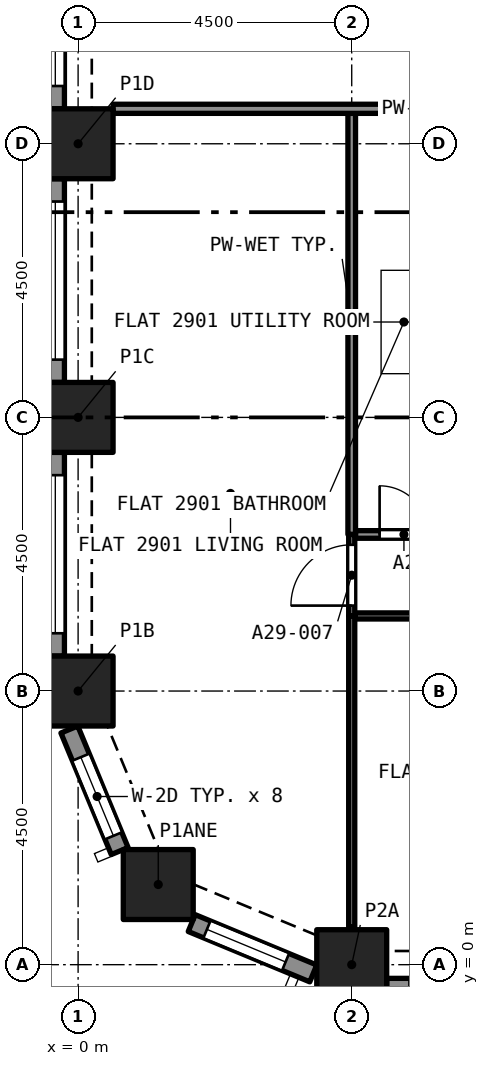
"""IFC4 building model, lengths in metres.
Left out: names, types, materials, properties, quantities, classifications, styles, units other than length and angle.
Written with IfcOpenShell. Run it as: python <this file> out.ifc"""

import sys

from ifc_helpers import new_model, si_unit, direction, frame, frame_2d, origin, origin_2d, place, context, subcontext, project, spatial, rectangle, extrude, element, fill, save


model = new_model("IFC4")
c1 = context("Model", 3, precision=1e-05, world=origin(), true_north=direction((0.0, 1.0)))
c2 = subcontext(c1, "Body", "Model", "MODEL_VIEW")
j1 = project(units=[si_unit("LENGTHUNIT", "METRE"), si_unit("PLANEANGLEUNIT", "RADIAN")], contexts=[c1])
p1 = place(None, origin())
s1 = spatial("IfcSite", under=j1, at=p1, CompositionType="ELEMENT")
p2 = place(p1, origin())
s2 = spatial("IfcBuilding", under=s1, at=p2, CompositionType="ELEMENT")
p3 = place(p2, frame((0.0, 0.0, 105.6)))
s3 = spatial("IfcBuildingStorey", under=s2, at=p3, CompositionType="ELEMENT", Elevation=105.6)
for number, where, z_axis, x_axis in (
    (1, (4.5, 0.0, 0.0), (0.0, 0.0, 1.0), (1.0, 0.0, 0.0)),
    (2, (1.318, 1.318, 0.0), (0.0, 0.0, 1.0), (1.0, 0.0, 0.0)),
    (3, (0.0, 4.5, 0.0), (0.0, 0.0, 1.0), (1.0, 0.0, 0.0)),
    (4, (0.0, 9.0, 0.0), (0.0, 0.0, 1.0), (1.0, 0.0, 0.0)),
    (5, (0.0, 13.5, 0.0), (0.0, 0.0, 1.0), (1.0, 0.0, 0.0)),
):
    element("IfcColumn", number, at=place(p3, frame(where, z_axis=z_axis, x_axis=x_axis)), inside=s3, PredefinedType="COLUMN", context=c2, shape_type="SweptSolid", body=[
        extrude(rectangle(XDim=1.15, YDim=1.15, at=origin_2d()), origin(), (0.0, 0.0, 1.0), 3.2),
    ])
p4 = place(p3, frame((0.684, 1.869, 0.0), z_axis=(0.0, 0.0, 1.0), x_axis=(-0.382723818695, 0.923862802911, 0.0)))
e6 = element("IfcWall", 6, at=p4, inside=s3, PredefinedType="SOLIDWALL", context=c2, shape_type="SweptSolid", body=[
    extrude(rectangle(XDim=2.164, YDim=0.3, at=frame_2d((1.082, 0.0))), origin(), (0.0, 0.0, 1.0), 3.2),
])
p5 = place(p4, frame((0.271, 0.0, 0.45)))
e7 = element("IfcOpeningElement", 7, at=p5, cuts=e6, PredefinedType="OPENING", context=c2, shape_type="SweptSolid", body=[
    extrude(rectangle(XDim=1.4, YDim=1.95, at=frame_2d((0.7, 0.975))), frame((0.0, 0.16, 0.0), z_axis=(0.0, -1.0, 0.0), x_axis=(1.0, 0.0, 0.0)), (0.0, 0.0, 1.0), 0.32),
])
p6 = place(p3, frame((3.868, -0.144, 0.0), z_axis=(0.0, 0.0, 1.0), x_axis=(-0.923862802911, 0.382723818695, 0.0)))
e8 = element("IfcWall", 8, at=p6, inside=s3, PredefinedType="SOLIDWALL", context=c2, shape_type="SweptSolid", body=[
    extrude(rectangle(XDim=2.164, YDim=0.3, at=frame_2d((1.082, 0.0))), origin(), (0.0, 0.0, 1.0), 3.2),
])
p7 = place(p6, frame((0.493, 0.0, 0.45)))
e9 = element("IfcOpeningElement", 9, at=p7, cuts=e8, PredefinedType="OPENING", context=c2, shape_type="SweptSolid", body=[
    extrude(rectangle(XDim=1.4, YDim=1.95, at=frame_2d((0.7, 0.975))), frame((0.0, 0.16, 0.0), z_axis=(0.0, -1.0, 0.0), x_axis=(1.0, 0.0, 0.0)), (0.0, 0.0, 1.0), 0.32),
])
p8 = place(p3, frame((8.425, -0.375, 0.0), z_axis=(0.0, 0.0, 1.0), x_axis=(-1.0, 0.0, 0.0)))
e10 = element("IfcWall", 10, at=p8, inside=s3, PredefinedType="SOLIDWALL", context=c2, shape_type="SweptSolid", body=[
    extrude(rectangle(XDim=3.35, YDim=0.3, at=frame_2d((1.675, 0.0))), origin(), (0.0, 0.0, 1.0), 3.2),
])
p9 = place(p8, frame((0.375, 0.0, 0.45)))
e11 = element("IfcOpeningElement", 11, at=p9, cuts=e10, PredefinedType="OPENING", context=c2, shape_type="SweptSolid", body=[
    extrude(rectangle(XDim=2.6, YDim=1.95, at=frame_2d((1.3, 0.975))), frame((0.0, 0.16, 0.0), z_axis=(0.0, -1.0, 0.0), x_axis=(1.0, 0.0, 0.0)), (0.0, 0.0, 1.0), 0.32),
])
p10 = place(p3, frame((-0.375, 14.075, 0.0), z_axis=(0.0, 0.0, 1.0), x_axis=(0.0, 1.0, 0.0)))
e12 = element("IfcWall", 12, at=p10, inside=s3, PredefinedType="SOLIDWALL", context=c2, shape_type="SweptSolid", body=[
    extrude(rectangle(XDim=3.35, YDim=0.3, at=frame_2d((1.675, 0.0))), origin(), (0.0, 0.0, 1.0), 3.2),
])
p11 = place(p10, frame((0.375, 0.0, 0.45)))
e13 = element("IfcOpeningElement", 13, at=p11, cuts=e12, PredefinedType="OPENING", context=c2, shape_type="SweptSolid", body=[
    extrude(rectangle(XDim=2.6, YDim=1.95, at=frame_2d((1.3, 0.975))), frame((0.0, 0.16, 0.0), z_axis=(0.0, -1.0, 0.0), x_axis=(1.0, 0.0, 0.0)), (0.0, 0.0, 1.0), 0.32),
])
p12 = place(p3, frame((-0.375, 9.575, 0.0), z_axis=(0.0, 0.0, 1.0), x_axis=(0.0, 1.0, 0.0)))
e14 = element("IfcWall", 14, at=p12, inside=s3, PredefinedType="SOLIDWALL", context=c2, shape_type="SweptSolid", body=[
    extrude(rectangle(XDim=3.35, YDim=0.3, at=frame_2d((1.675, 0.0))), origin(), (0.0, 0.0, 1.0), 3.2),
])
p13 = place(p12, frame((0.375, 0.0, 0.45)))
e15 = element("IfcOpeningElement", 15, at=p13, cuts=e14, PredefinedType="OPENING", context=c2, shape_type="SweptSolid", body=[
    extrude(rectangle(XDim=2.6, YDim=1.95, at=frame_2d((1.3, 0.975))), frame((0.0, 0.16, 0.0), z_axis=(0.0, -1.0, 0.0), x_axis=(1.0, 0.0, 0.0)), (0.0, 0.0, 1.0), 0.32),
])
p14 = place(p3, frame((-0.375, 5.075, 0.0), z_axis=(0.0, 0.0, 1.0), x_axis=(0.0, 1.0, 0.0)))
e16 = element("IfcWall", 16, at=p14, inside=s3, PredefinedType="SOLIDWALL", context=c2, shape_type="SweptSolid", body=[
    extrude(rectangle(XDim=3.35, YDim=0.3, at=frame_2d((1.675, 0.0))), origin(), (0.0, 0.0, 1.0), 3.2),
])
p15 = place(p14, frame((0.375, 0.0, 0.45)))
e17 = element("IfcOpeningElement", 17, at=p15, cuts=e16, PredefinedType="OPENING", context=c2, shape_type="SweptSolid", body=[
    extrude(rectangle(XDim=2.6, YDim=1.95, at=frame_2d((1.3, 0.975))), frame((0.0, 0.16, 0.0), z_axis=(0.0, -1.0, 0.0), x_axis=(1.0, 0.0, 0.0)), (0.0, 0.0, 1.0), 0.32),
])
p16 = place(p3, frame((4.562, 7.075, 0.0), z_axis=(0.0, 0.0, 1.0), x_axis=(1.0, 0.0, 0.0)))
e18 = element("IfcWall", 18, at=p16, inside=s3, PredefinedType="PARTITIONING", context=c2, shape_type="SweptSolid", body=[
    extrude(rectangle(XDim=1.655, YDim=0.125, at=frame_2d((0.827, 0.0))), origin(), (0.0, 0.0, 1.0), 2.9),
])
p17 = place(p16, frame((0.396, 0.0, 0.0)))
e19 = element("IfcOpeningElement", 19, at=p17, cuts=e18, PredefinedType="OPENING", context=c2, shape_type="SweptSolid", body=[
    extrude(rectangle(XDim=0.8, YDim=2.1, at=frame_2d((0.4, 1.05))), frame((0.0, 0.073, 0.0), z_axis=(0.0, -1.0, 0.0), x_axis=(1.0, 0.0, 0.0)), (0.0, 0.0, 1.0), 0.145),
])
p18 = place(p3, frame((4.5, 7.075, 0.0), z_axis=(0.0, 0.0, 1.0), x_axis=(0.0, 1.0, 0.0)))
e20 = element("IfcWall", 20, at=p18, inside=s3, PredefinedType="PARTITIONING", context=c2, shape_type="SweptSolid", body=[
    extrude(rectangle(XDim=6.925, YDim=0.125, at=frame_2d((3.462, 0.0))), origin(), (0.0, 0.0, 1.0), 2.9),
])
p19 = place(p3, frame((9.0, 5.735, 0.0), z_axis=(0.0, 0.0, 1.0), x_axis=(-1.0, 0.0, 0.0)))
e21 = element("IfcWall", 21, at=p19, inside=s3, PredefinedType="PARTITIONING", context=c2, shape_type="SweptSolid", body=[
    extrude(rectangle(XDim=4.45, YDim=0.1, at=frame_2d((2.225, 0.0))), origin(), (0.0, 0.0, 1.0), 2.9),
])
p20 = place(p19, frame((1.8, 0.0, 0.0)))
e22 = element("IfcOpeningElement", 22, at=p20, cuts=e21, PredefinedType="OPENING", context=c2, shape_type="SweptSolid", body=[
    extrude(rectangle(XDim=0.9, YDim=2.1, at=frame_2d((0.45, 1.05))), frame((0.0, 0.06, 0.0), z_axis=(0.0, -1.0, 0.0), x_axis=(1.0, 0.0, 0.0)), (0.0, 0.0, 1.0), 0.12),
])
p21 = place(p3, frame((4.5, 0.622, 0.0), z_axis=(0.0, 0.0, 1.0), x_axis=(0.0, 1.0, 0.0)))
e23 = element("IfcWall", 23, at=p21, inside=s3, PredefinedType="PARTITIONING", context=c2, shape_type="SweptSolid", body=[
    extrude(rectangle(XDim=5.113, YDim=0.1, at=frame_2d((2.556, 0.0))), origin(), (0.0, 0.0, 1.0), 2.9),
])
p22 = place(p3, frame((4.5, 5.735, 0.0), z_axis=(0.0, 0.0, 1.0), x_axis=(0.0, 1.0, 0.0)))
e24 = element("IfcWall", 24, at=p22, inside=s3, PredefinedType="PARTITIONING", context=c2, shape_type="SweptSolid", body=[
    extrude(rectangle(XDim=1.34, YDim=0.1, at=frame_2d((0.67, 0.0))), origin(), (0.0, 0.0, 1.0), 2.9),
])
p23 = place(p22, frame((0.17, 0.0, 0.0)))
e25 = element("IfcOpeningElement", 25, at=p23, cuts=e24, PredefinedType="OPENING", context=c2, shape_type="SweptSolid", body=[
    extrude(rectangle(XDim=1.0, YDim=2.1, at=frame_2d((0.5, 1.05))), frame((0.0, 0.06, 0.0), z_axis=(0.0, -1.0, 0.0), x_axis=(1.0, 0.0, 0.0)), (0.0, 0.0, 1.0), 0.12),
])
p24 = place(p3, frame((0.575, 14.075, 0.0), z_axis=(0.0, 0.0, 1.0), x_axis=(1.0, 0.0, 0.0)))
e26 = element("IfcWall", 26, at=p24, inside=s3, PredefinedType="PARTITIONING", context=c2, shape_type="SweptSolid", body=[
    extrude(rectangle(XDim=13.45, YDim=0.15, at=frame_2d((6.725, 0.0))), origin(), (0.0, 0.0, 1.0), 2.9),
])
p25 = place(p5, origin())
e27 = element("IfcWindow", 27, at=p25, inside=s3, PartitioningType="SINGLE_PANEL", PredefinedType="WINDOW", context=c2, shape_type="SweptSolid", body=[
    extrude(rectangle(XDim=1.4, YDim=1.95, at=frame_2d((0.7, 0.975))), frame((0.0, 0.03, 0.0), z_axis=(0.0, -1.0, 0.0), x_axis=(1.0, 0.0, 0.0)), (0.0, 0.0, 1.0), 0.06),
])
fill(e7, e27)
p26 = place(p7, origin())
e28 = element("IfcWindow", 28, at=p26, inside=s3, PartitioningType="SINGLE_PANEL", PredefinedType="WINDOW", context=c2, shape_type="SweptSolid", body=[
    extrude(rectangle(XDim=1.4, YDim=1.95, at=frame_2d((0.7, 0.975))), frame((0.0, 0.03, 0.0), z_axis=(0.0, -1.0, 0.0), x_axis=(1.0, 0.0, 0.0)), (0.0, 0.0, 1.0), 0.06),
])
fill(e9, e28)
p27 = place(p11, origin())
e29 = element("IfcWindow", 29, at=p27, inside=s3, PartitioningType="SINGLE_PANEL", PredefinedType="WINDOW", context=c2, shape_type="SweptSolid", body=[
    extrude(rectangle(XDim=2.6, YDim=1.95, at=frame_2d((1.3, 0.975))), frame((0.0, 0.03, 0.0), z_axis=(0.0, -1.0, 0.0), x_axis=(1.0, 0.0, 0.0)), (0.0, 0.0, 1.0), 0.06),
])
fill(e13, e29)
p28 = place(p13, origin())
e30 = element("IfcWindow", 30, at=p28, inside=s3, PartitioningType="SINGLE_PANEL", PredefinedType="WINDOW", context=c2, shape_type="SweptSolid", body=[
    extrude(rectangle(XDim=2.6, YDim=1.95, at=frame_2d((1.3, 0.975))), frame((0.0, 0.03, 0.0), z_axis=(0.0, -1.0, 0.0), x_axis=(1.0, 0.0, 0.0)), (0.0, 0.0, 1.0), 0.06),
])
fill(e15, e30)
p29 = place(p15, origin())
e31 = element("IfcWindow", 31, at=p29, inside=s3, PartitioningType="SINGLE_PANEL", PredefinedType="WINDOW", context=c2, shape_type="SweptSolid", body=[
    extrude(rectangle(XDim=2.6, YDim=1.95, at=frame_2d((1.3, 0.975))), frame((0.0, 0.03, 0.0), z_axis=(0.0, -1.0, 0.0), x_axis=(1.0, 0.0, 0.0)), (0.0, 0.0, 1.0), 0.06),
])
fill(e17, e31)
p30 = place(p17, origin())
e32 = element("IfcDoor", 32, at=p30, inside=s3, OperationType="SINGLE_SWING_LEFT", PredefinedType="DOOR", context=c2, shape_type="SweptSolid", body=[
    extrude(rectangle(XDim=0.8, YDim=2.1, at=frame_2d((0.4, 1.05))), frame((0.0, 0.025, 0.0), z_axis=(0.0, -1.0, 0.0), x_axis=(1.0, 0.0, 0.0)), (0.0, 0.0, 1.0), 0.05),
])
fill(e19, e32)
p31 = place(p23, origin())
e33 = element("IfcDoor", 33, at=p31, inside=s3, OperationType="SINGLE_SWING_RIGHT", PredefinedType="DOOR", context=c2, shape_type="SweptSolid", body=[
    extrude(rectangle(XDim=1.0, YDim=2.1, at=frame_2d((0.5, 1.05))), frame((0.0, 0.025, 0.0), z_axis=(0.0, -1.0, 0.0), x_axis=(1.0, 0.0, 0.0)), (0.0, 0.0, 1.0), 0.05),
])
fill(e25, e33)
save(model, sys.argv[1])
